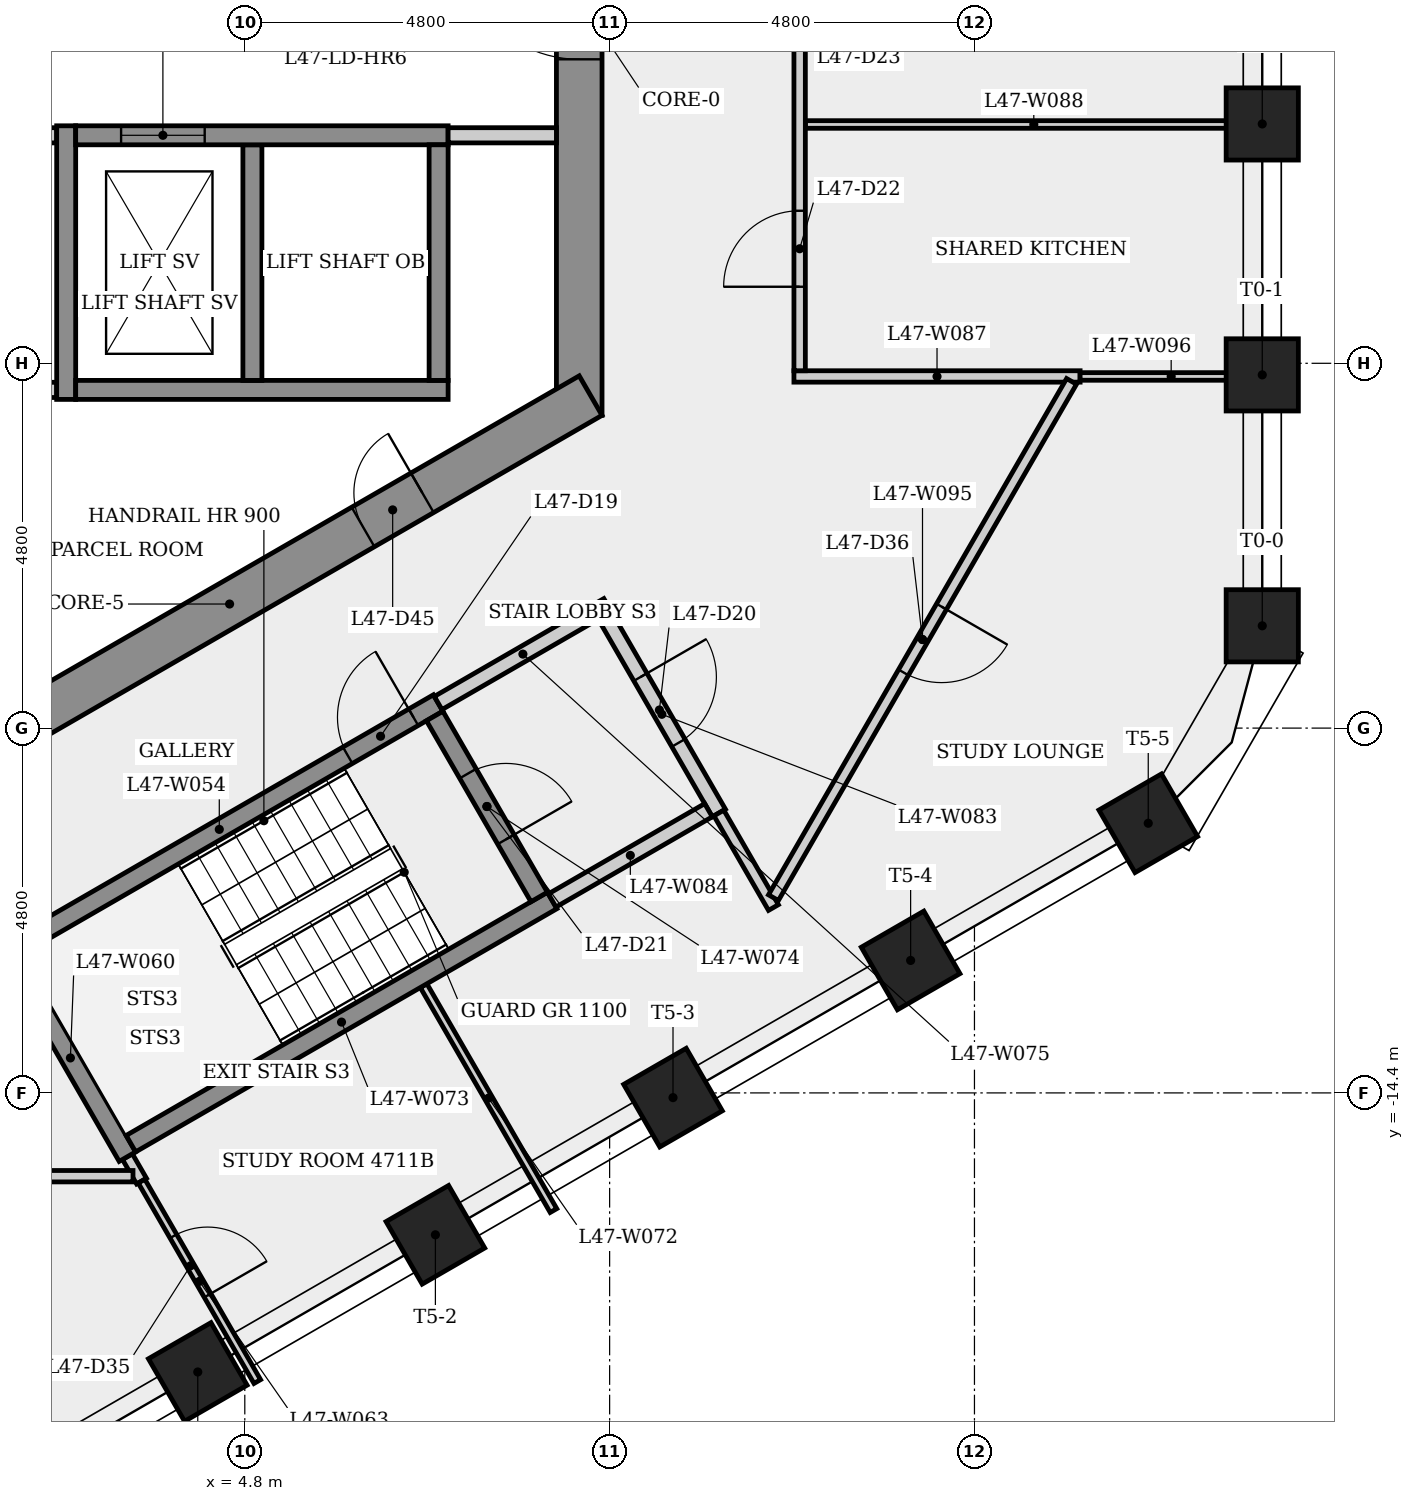
"""IFC4 building model, lengths in metres.
Left out: names, types, materials, properties, quantities, classifications, styles, units other than length and angle.
Written with IfcOpenShell. Run it as: python <this file> out.ifc"""

import sys

from ifc_helpers import new_model, si_unit, direction, frame, frame_2d, origin, origin_2d, place, context, subcontext, project, spatial, rectangle, extrude, element, fill, save


model = new_model("IFC4")
c1 = context("Model", 3, precision=1e-05, world=origin(), true_north=direction((0.0, 1.0)))
c2 = subcontext(c1, "Body", "Model", "MODEL_VIEW")
j1 = project(units=[si_unit("LENGTHUNIT", "METRE"), si_unit("PLANEANGLEUNIT", "RADIAN")], contexts=[c1])
p1 = place(None, origin())
s1 = spatial("IfcSite", under=j1, at=p1, CompositionType="ELEMENT")
p2 = place(p1, origin())
s2 = spatial("IfcBuilding", under=s1, at=p2, CompositionType="ELEMENT")
p3 = place(p2, frame((0.0, 0.0, 176.5)))
s3 = spatial("IfcBuildingStorey", under=s2, at=p3, CompositionType="ELEMENT", Elevation=176.5)
p4 = place(p3, frame((9.2, -5.485, 0.0), z_axis=(0.0, 0.0, 1.0), x_axis=(0.0, 1.0, 0.0)))
e1 = element("IfcWall", 1, at=p4, inside=s3, PredefinedType="SHEAR", context=c2, shape_type="SweptSolid", body=[
    extrude(rectangle(XDim=10.97, YDim=0.6, at=frame_2d((5.485, 0.0))), origin(), (0.0, 0.0, 1.0), 3.4),
])
p5 = place(p4, frame((4.685, 0.0, 0.0)))
e2 = element("IfcOpeningElement", 2, at=p5, cuts=e1, PredefinedType="OPENING", context=c2, shape_type="SweptSolid", body=[
    extrude(rectangle(XDim=1.6, YDim=2.1, at=frame_2d((0.8, 1.05))), frame((0.0, 0.31, 0.0), z_axis=(0.0, -1.0, 0.0), x_axis=(1.0, 0.0, 0.0)), (0.0, 0.0, 1.0), 0.62),
])
p6 = place(p3, frame((-0.15, -10.71, 0.0), z_axis=(0.0, 0.0, 1.0), x_axis=(0.866023993627, 0.500002442456, 0.0)))
e3 = element("IfcWall", 3, at=p6, inside=s3, PredefinedType="SHEAR", context=c2, shape_type="SweptSolid", body=[
    extrude(rectangle(XDim=10.97, YDim=0.6, at=frame_2d((5.485, 0.0))), origin(), (0.0, 0.0, 1.0), 3.4),
])
p7 = place(p6, frame((0.9, 0.0, 0.0)))
e4 = element("IfcOpeningElement", 4, at=p7, cuts=e3, PredefinedType="OPENING", context=c2, shape_type="SweptSolid", body=[
    extrude(rectangle(XDim=0.9, YDim=2.1, at=frame_2d((0.45, 1.05))), frame((0.0, 0.31, 0.0), z_axis=(0.0, -1.0, 0.0), x_axis=(1.0, 0.0, 0.0)), (0.0, 0.0, 1.0), 0.62),
])
p8 = place(p6, frame((7.512, 0.0, 0.0)))
e5 = element("IfcOpeningElement", 5, at=p8, cuts=e3, PredefinedType="OPENING", context=c2, shape_type="SweptSolid", body=[
    extrude(rectangle(XDim=0.9, YDim=2.1, at=frame_2d((0.45, 1.05))), frame((0.0, 0.31, 0.0), z_axis=(0.0, -1.0, 0.0), x_axis=(1.0, 0.0, 0.0)), (0.0, 0.0, 1.0), 0.62),
])
for number, where, z_axis, x_axis in (
    (6, (18.187, -8.254, 0.0), (0.0, 0.0, 1.0), (1.0, 0.0, 0.0)),
    (7, (18.187, -4.952, 0.0), (0.0, 0.0, 1.0), (1.0, 0.0, 0.0)),
    (8, (18.187, -1.651, 0.0), (0.0, 0.0, 1.0), (1.0, 0.0, 0.0)),
    (9, (4.181, -18.072, 0.0), (0.0, 0.0, 1.0), (0.5, -0.866, 0.0)),
    (10, (7.308, -16.267, 0.0), (0.0, 0.0, 1.0), (0.5, -0.866, 0.0)),
    (11, (10.434, -14.462, 0.0), (0.0, 0.0, 1.0), (0.5, -0.866, 0.0)),
    (12, (13.56, -12.657, 0.0), (0.0, 0.0, 1.0), (0.5, -0.866, 0.0)),
    (13, (16.687, -10.852, 0.0), (0.0, 0.0, 1.0), (0.5, -0.866, 0.0)),
):
    element("IfcColumn", number, at=place(p3, frame(where, z_axis=z_axis, x_axis=x_axis)), inside=s3, PredefinedType="COLUMN", context=c2, shape_type="SweptSolid", body=[
        extrude(rectangle(XDim=0.95, YDim=0.95, at=origin_2d()), origin(), (0.0, 0.0, 1.0), 3.4),
    ])
p9 = place(p3, frame((-8.88, -5.15, 0.0), z_axis=(0.0, 0.0, 1.0), x_axis=(1.0, 0.0, 0.0)))
e14 = element("IfcWall", 14, at=p9, inside=s3, PredefinedType="PARTITIONING", context=c2, shape_type="SweptSolid", body=[
    extrude(rectangle(XDim=11.205, YDim=0.2, at=frame_2d((5.603, 0.0))), origin(), (0.0, 0.0, 1.0), 3.05),
])
p10 = place(p3, frame((-8.9, -1.8, 0.0), z_axis=(0.0, 0.0, 1.0), x_axis=(1.0, 0.0, 0.0)))
e15 = element("IfcWall", 15, at=p10, inside=s3, PredefinedType="PARTITIONING", context=c2, shape_type="SweptSolid", body=[
    extrude(rectangle(XDim=11.225, YDim=0.2, at=frame_2d((5.613, 0.0))), origin(), (0.0, 0.0, 1.0), 3.05),
])
p11 = place(p10, frame((2.16, 0.0, 0.0)))
e16 = element("IfcOpeningElement", 16, at=p11, cuts=e15, PredefinedType="OPENING", context=c2, shape_type="SweptSolid", body=[
    extrude(rectangle(XDim=0.9, YDim=2.1, at=frame_2d((0.45, 1.05))), frame((0.0, 0.11, 0.0), z_axis=(0.0, -1.0, 0.0), x_axis=(1.0, 0.0, 0.0)), (0.0, 0.0, 1.0), 0.22),
])
p12 = place(p10, frame((6.61, 0.0, 0.0)))
e17 = element("IfcOpeningElement", 17, at=p12, cuts=e15, PredefinedType="OPENING", context=c2, shape_type="SweptSolid", body=[
    extrude(rectangle(XDim=0.9, YDim=2.1, at=frame_2d((0.45, 1.05))), frame((0.0, 0.11, 0.0), z_axis=(0.0, -1.0, 0.0), x_axis=(1.0, 0.0, 0.0)), (0.0, 0.0, 1.0), 0.22),
])
p13 = place(p10, frame((9.613, 0.0, 0.0)))
e18 = element("IfcOpeningElement", 18, at=p13, cuts=e15, PredefinedType="OPENING", context=c2, shape_type="SweptSolid", body=[
    extrude(rectangle(XDim=0.9, YDim=2.1, at=frame_2d((0.45, 1.05))), frame((0.0, 0.11, 0.0), z_axis=(0.0, -1.0, 0.0), x_axis=(1.0, 0.0, 0.0)), (0.0, 0.0, 1.0), 0.22),
])
p14 = place(p3, frame((1.585, -12.595, 0.0), z_axis=(0.0, 0.0, 1.0), x_axis=(0.866036417653, 0.499980922934, 0.0)))
e19 = element("IfcWall", 19, at=p14, inside=s3, PredefinedType="SHEAR", context=c2, shape_type="SweptSolid", body=[
    extrude(rectangle(XDim=6.65, YDim=0.25, at=frame_2d((3.325, 0.0))), origin(), (0.0, 0.0, 1.0), 3.05),
])
p15 = place(p14, frame((5.275, 0.0, 0.0)))
e20 = element("IfcOpeningElement", 20, at=p15, cuts=e19, PredefinedType="OPENING", context=c2, shape_type="SweptSolid", body=[
    extrude(rectangle(XDim=1.0, YDim=2.1, at=frame_2d((0.5, 1.05))), frame((0.0, 0.135, 0.0), z_axis=(0.0, -1.0, 0.0), x_axis=(1.0, 0.0, 0.0)), (0.0, 0.0, 1.0), 0.27),
])
p16 = place(p3, frame((2.45, -5.275, 0.0), z_axis=(0.0, 0.0, 1.0), x_axis=(0.0, 1.0, 0.0)))
e21 = element("IfcWall", 21, at=p16, inside=s3, PredefinedType="SHEAR", context=c2, shape_type="SweptSolid", body=[
    extrude(rectangle(XDim=3.6, YDim=0.25, at=frame_2d((1.8, 0.0))), origin(), (0.0, 0.0, 1.0), 3.05),
])
p17 = place(p3, frame((3.256, -15.239, 0.0), z_axis=(0.0, 0.0, 1.0), x_axis=(0.499949632511, -0.866054481515, 0.0)))
e22 = element("IfcWall", 22, at=p17, inside=s3, PredefinedType="PARTITIONING", context=c2, shape_type="SweptSolid", body=[
    extrude(rectangle(XDim=0.372, YDim=0.15, at=frame_2d((0.186, 0.0))), origin(), (0.0, 0.0, 1.0), 3.05),
])
p18 = place(p3, frame((3.256, -15.239, 0.0), z_axis=(0.0, 0.0, 1.0), x_axis=(-0.50002537861, 0.866010750942, 0.0)))
e23 = element("IfcWall", 23, at=p18, inside=s3, PredefinedType="SHEAR", context=c2, shape_type="SweptSolid", body=[
    extrude(rectangle(XDim=3.0, YDim=0.25, at=frame_2d((1.5, 0.0))), origin(), (0.0, 0.0, 1.0), 3.05),
])
p19 = place(p3, frame((3.329, -15.496, 0.0), z_axis=(0.0, 0.0, 1.0), x_axis=(-1.0, 0.0, 0.0)))
e24 = element("IfcWall", 24, at=p19, inside=s3, PredefinedType="PARTITIONING", context=c2, shape_type="SweptSolid", body=[
    extrude(rectangle(XDim=3.837, YDim=0.15, at=frame_2d((1.918, 0.0))), origin(), (0.0, 0.0, 1.0), 3.05),
])
p20 = place(p19, frame((1.418, 0.0, 0.0)))
e25 = element("IfcOpeningElement", 25, at=p20, cuts=e24, PredefinedType="OPENING", context=c2, shape_type="SweptSolid", body=[
    extrude(rectangle(XDim=1.0, YDim=2.1, at=frame_2d((0.5, 1.05))), frame((0.0, 0.085, 0.0), z_axis=(0.0, -1.0, 0.0), x_axis=(1.0, 0.0, 0.0)), (0.0, 0.0, 1.0), 0.17),
])
p21 = place(p3, frame((3.442, -15.561, 0.0), z_axis=(0.0, 0.0, 1.0), x_axis=(0.500002389912, -0.866024023964, 0.0)))
e26 = element("IfcWall", 26, at=p21, inside=s3, PredefinedType="PARTITIONING", context=c2, shape_type="SweptSolid", body=[
    extrude(rectangle(XDim=3.045, YDim=0.1, at=frame_2d((1.522, 0.0))), origin(), (0.0, 0.0, 1.0), 3.05),
])
p22 = place(p21, frame((0.837, 0.0, 0.0)))
e27 = element("IfcOpeningElement", 27, at=p22, cuts=e26, PredefinedType="OPENING", context=c2, shape_type="SweptSolid", body=[
    extrude(rectangle(XDim=0.9, YDim=2.1, at=frame_2d((0.45, 1.05))), frame((0.0, 0.06, 0.0), z_axis=(0.0, -1.0, 0.0), x_axis=(1.0, 0.0, 0.0)), (0.0, 0.0, 1.0), 0.12),
])
p23 = place(p3, frame((2.575, -5.15, 0.0), z_axis=(0.0, 0.0, 1.0), x_axis=(1.0, 0.0, 0.0)))
e28 = element("IfcWall", 28, at=p23, inside=s3, PredefinedType="SHEAR", context=c2, shape_type="SweptSolid", body=[
    extrude(rectangle(XDim=4.9, YDim=0.25, at=frame_2d((2.45, 0.0))), origin(), (0.0, 0.0, 1.0), 3.05),
])
p24 = place(p3, frame((4.9, -1.925, 0.0), z_axis=(0.0, 0.0, 1.0), x_axis=(0.0, -1.0, 0.0)))
e29 = element("IfcWall", 29, at=p24, inside=s3, PredefinedType="SHEAR", context=c2, shape_type="SweptSolid", body=[
    extrude(rectangle(XDim=3.1, YDim=0.25, at=frame_2d((1.55, 0.0))), origin(), (0.0, 0.0, 1.0), 3.4),
])
p25 = place(p3, frame((2.575, -1.8, 0.0), z_axis=(0.0, 0.0, 1.0), x_axis=(1.0, 0.0, 0.0)))
e30 = element("IfcWall", 30, at=p25, inside=s3, PredefinedType="SHEAR", context=c2, shape_type="SweptSolid", body=[
    extrude(rectangle(XDim=4.9, YDim=0.25, at=frame_2d((2.45, 0.0))), origin(), (0.0, 0.0, 1.0), 3.05),
])
p26 = place(p25, frame((0.597, 0.0, 0.0)))
e31 = element("IfcOpeningElement", 31, at=p26, cuts=e30, PredefinedType="OPENING", context=c2, shape_type="SweptSolid", body=[
    extrude(rectangle(XDim=1.1, YDim=2.1, at=frame_2d((0.55, 1.05))), frame((0.0, 0.135, 0.0), z_axis=(0.0, -1.0, 0.0), x_axis=(1.0, 0.0, 0.0)), (0.0, 0.0, 1.0), 0.27),
])
p27 = place(p3, frame((7.153, -12.989, 0.0), z_axis=(0.0, 0.0, 1.0), x_axis=(0.4999966448, -0.866027340901, 0.0)))
e32 = element("IfcWall", 32, at=p27, inside=s3, PredefinedType="PARTITIONING", context=c2, shape_type="SweptSolid", body=[
    extrude(rectangle(XDim=3.417, YDim=0.1, at=frame_2d((1.708, 0.0))), origin(), (0.0, 0.0, 1.0), 3.05),
])
p28 = place(p3, frame((3.301, -15.068, 0.0), z_axis=(0.0, 0.0, 1.0), x_axis=(0.866035036182, 0.499983315828, 0.0)))
e33 = element("IfcWall", 33, at=p28, inside=s3, PredefinedType="SHEAR", context=c2, shape_type="SweptSolid", body=[
    extrude(rectangle(XDim=6.4, YDim=0.25, at=frame_2d((3.2, 0.0))), origin(), (0.0, 0.0, 1.0), 3.05),
])
p29 = place(p3, frame((7.298, -9.441, 0.0), z_axis=(0.0, 0.0, 1.0), x_axis=(0.500034990121, -0.866005201286, 0.0)))
e34 = element("IfcWall", 34, at=p29, inside=s3, PredefinedType="SHEAR", context=c2, shape_type="SweptSolid", body=[
    extrude(rectangle(XDim=2.75, YDim=0.25, at=frame_2d((1.375, 0.0))), origin(), (0.0, 0.0, 1.0), 3.05),
])
p30 = place(p29, frame((0.875, 0.0, 0.0)))
e35 = element("IfcOpeningElement", 35, at=p30, cuts=e34, PredefinedType="OPENING", context=c2, shape_type="SweptSolid", body=[
    extrude(rectangle(XDim=1.0, YDim=2.1, at=frame_2d((0.5, 1.05))), frame((0.0, 0.135, 0.0), z_axis=(0.0, -1.0, 0.0), x_axis=(1.0, 0.0, 0.0)), (0.0, 0.0, 1.0), 0.27),
])
p31 = place(p3, frame((7.344, -9.27, 0.0), z_axis=(0.0, 0.0, 1.0), x_axis=(0.866005588531, 0.500034319456, 0.0)))
e36 = element("IfcWall", 36, at=p31, inside=s3, PredefinedType="PARTITIONING", context=c2, shape_type="SweptSolid", body=[
    extrude(rectangle(XDim=2.575, YDim=0.2, at=frame_2d((1.288, 0.0))), origin(), (0.0, 0.0, 1.0), 3.05),
])
p32 = place(p3, frame((7.35, -1.925, 0.0), z_axis=(0.0, 0.0, 1.0), x_axis=(0.0, -1.0, 0.0)))
e37 = element("IfcWall", 37, at=p32, inside=s3, PredefinedType="SHEAR", context=c2, shape_type="SweptSolid", body=[
    extrude(rectangle(XDim=3.1, YDim=0.25, at=frame_2d((1.55, 0.0))), origin(), (0.0, 0.0, 1.0), 3.4),
])
p33 = place(p3, frame((8.9, -1.8, 0.0), z_axis=(0.0, 0.0, 1.0), x_axis=(-1.0, 0.0, 0.0)))
e38 = element("IfcWall", 38, at=p33, inside=s3, PredefinedType="PARTITIONING", context=c2, shape_type="SweptSolid", body=[
    extrude(rectangle(XDim=1.425, YDim=0.2, at=frame_2d((0.712, 0.0))), origin(), (0.0, 0.0, 1.0), 3.05),
])
p34 = place(p3, frame((9.537, -8.119, 0.0), z_axis=(0.0, 0.0, 1.0), x_axis=(0.499990139034, -0.866031096941, 0.0)))
e39 = element("IfcWall", 39, at=p34, inside=s3, PredefinedType="PARTITIONING", context=c2, shape_type="SweptSolid", body=[
    extrude(rectangle(XDim=3.0, YDim=0.2, at=frame_2d((1.5, 0.0))), origin(), (0.0, 0.0, 1.0), 3.05),
])
p35 = place(p34, frame((0.935, 0.0, 0.0)))
e40 = element("IfcOpeningElement", 40, at=p35, cuts=e39, PredefinedType="OPENING", context=c2, shape_type="SweptSolid", body=[
    extrude(rectangle(XDim=1.0, YDim=2.1, at=frame_2d((0.5, 1.05))), frame((0.0, 0.11, 0.0), z_axis=(0.0, -1.0, 0.0), x_axis=(1.0, 0.0, 0.0)), (0.0, 0.0, 1.0), 0.22),
])
p36 = place(p3, frame((10.901, -10.681, 0.0), z_axis=(0.0, 0.0, 1.0), x_axis=(-0.866007538022, -0.500030943131, 0.0)))
e41 = element("IfcWall", 41, at=p36, inside=s3, PredefinedType="PARTITIONING", context=c2, shape_type="SweptSolid", body=[
    extrude(rectangle(XDim=2.375, YDim=0.2, at=frame_2d((1.188, 0.0))), origin(), (0.0, 0.0, 1.0), 3.05),
])
p37 = place(p3, frame((11.755, -11.961, 0.0), z_axis=(0.0, 0.0, 1.0), x_axis=(-0.49992355341, 0.866069535745, 0.0)))
e42 = element("IfcWall", 42, at=p37, inside=s3, PredefinedType="PARTITIONING", context=c2, shape_type="SweptSolid", body=[
    extrude(rectangle(XDim=1.436, YDim=0.15, at=frame_2d((0.718, 0.0))), origin(), (0.0, 0.0, 1.0), 3.05),
])
p38 = place(p3, frame((12.025, -4.973, 0.0), z_axis=(0.0, 0.0, 1.0), x_axis=(1.0, 0.0, 0.0)))
e43 = element("IfcWall", 43, at=p38, inside=s3, PredefinedType="PARTITIONING", context=c2, shape_type="SweptSolid", body=[
    extrude(rectangle(XDim=3.765, YDim=0.15, at=frame_2d((1.883, 0.0))), origin(), (0.0, 0.0, 1.0), 3.05),
])
p39 = place(p3, frame((12.175, -1.658, 0.0), z_axis=(0.0, 0.0, 1.0), x_axis=(1.0, 0.0, 0.0)))
e44 = element("IfcWall", 44, at=p39, inside=s3, PredefinedType="PARTITIONING", context=c2, shape_type="SweptSolid", body=[
    extrude(rectangle(XDim=6.011, YDim=0.1, at=frame_2d((3.006, 0.0))), origin(), (0.0, 0.0, 1.0), 3.05),
])
p40 = place(p3, frame((12.1, -4.898, 0.0), z_axis=(0.0, 0.0, 1.0), x_axis=(0.0, 1.0, 0.0)))
e45 = element("IfcWall", 45, at=p40, inside=s3, PredefinedType="PARTITIONING", context=c2, shape_type="SweptSolid", body=[
    extrude(rectangle(XDim=9.946, YDim=0.15, at=frame_2d((4.973, 0.0))), origin(), (0.0, 0.0, 1.0), 3.05),
])
p41 = place(p40, frame((1.105, 0.0, 0.0)))
e46 = element("IfcOpeningElement", 46, at=p41, cuts=e45, PredefinedType="OPENING", context=c2, shape_type="SweptSolid", body=[
    extrude(rectangle(XDim=1.0, YDim=2.1, at=frame_2d((0.5, 1.05))), frame((0.0, 0.085, 0.0), z_axis=(0.0, -1.0, 0.0), x_axis=(1.0, 0.0, 0.0)), (0.0, 0.0, 1.0), 0.17),
])
p42 = place(p40, frame((4.398, 0.0, 0.0)))
e47 = element("IfcOpeningElement", 47, at=p42, cuts=e45, PredefinedType="OPENING", context=c2, shape_type="SweptSolid", body=[
    extrude(rectangle(XDim=1.0, YDim=2.1, at=frame_2d((0.5, 1.05))), frame((0.0, 0.085, 0.0), z_axis=(0.0, -1.0, 0.0), x_axis=(1.0, 0.0, 0.0)), (0.0, 0.0, 1.0), 0.17),
])
p43 = place(p40, frame((7.713, 0.0, 0.0)))
e48 = element("IfcOpeningElement", 48, at=p43, cuts=e45, PredefinedType="OPENING", context=c2, shape_type="SweptSolid", body=[
    extrude(rectangle(XDim=1.0, YDim=2.1, at=frame_2d((0.5, 1.05))), frame((0.0, 0.085, 0.0), z_axis=(0.0, -1.0, 0.0), x_axis=(1.0, 0.0, 0.0)), (0.0, 0.0, 1.0), 0.17),
])
p44 = place(p3, frame((15.677, -5.038, 0.0), z_axis=(0.0, 0.0, 1.0), x_axis=(-0.500005339912, -0.866022320763, 0.0)))
e49 = element("IfcWall", 49, at=p44, inside=s3, PredefinedType="PARTITIONING", context=c2, shape_type="SweptSolid", body=[
    extrude(rectangle(XDim=7.844, YDim=0.15, at=frame_2d((3.922, 0.0))), origin(), (0.0, 0.0, 1.0), 3.05),
])
p45 = place(p44, frame((3.422, 0.0, 0.0)))
e50 = element("IfcOpeningElement", 50, at=p45, cuts=e49, PredefinedType="OPENING", context=c2, shape_type="SweptSolid", body=[
    extrude(rectangle(XDim=1.0, YDim=2.1, at=frame_2d((0.5, 1.05))), frame((0.0, 0.085, 0.0), z_axis=(0.0, -1.0, 0.0), x_axis=(1.0, 0.0, 0.0)), (0.0, 0.0, 1.0), 0.17),
])
p46 = place(p3, frame((18.187, -4.973, 0.0), z_axis=(0.0, 0.0, 1.0), x_axis=(-1.0, 0.0, 0.0)))
e51 = element("IfcWall", 51, at=p46, inside=s3, PredefinedType="PARTITIONING", context=c2, shape_type="SweptSolid", body=[
    extrude(rectangle(XDim=2.397, YDim=0.1, at=frame_2d((1.198, 0.0))), origin(), (0.0, 0.0, 1.0), 3.05),
])
p47 = place(p26, origin())
e52 = element("IfcDoor", 52, at=p47, inside=s3, OperationType="SLIDING_TO_LEFT", PredefinedType="DOOR", context=c2, shape_type="SweptSolid", body=[
    extrude(rectangle(XDim=1.1, YDim=2.1, at=frame_2d((0.55, 1.05))), frame((0.0, 0.025, 0.0), z_axis=(0.0, -1.0, 0.0), x_axis=(1.0, 0.0, 0.0)), (0.0, 0.0, 1.0), 0.05),
])
fill(e31, e52)
p48 = place(p15, origin())
e53 = element("IfcDoor", 53, at=p48, inside=s3, OperationType="SINGLE_SWING_RIGHT", PredefinedType="DOOR", context=c2, shape_type="SweptSolid", body=[
    extrude(rectangle(XDim=1.0, YDim=2.1, at=frame_2d((0.5, 1.05))), frame((0.0, 0.025, 0.0), z_axis=(0.0, -1.0, 0.0), x_axis=(1.0, 0.0, 0.0)), (0.0, 0.0, 1.0), 0.05),
])
fill(e20, e53)
p49 = place(p35, origin())
e54 = element("IfcDoor", 54, at=p49, inside=s3, OperationType="SINGLE_SWING_LEFT", PredefinedType="DOOR", context=c2, shape_type="SweptSolid", body=[
    extrude(rectangle(XDim=1.0, YDim=2.1, at=frame_2d((0.5, 1.05))), frame((0.0, 0.025, 0.0), z_axis=(0.0, -1.0, 0.0), x_axis=(1.0, 0.0, 0.0)), (0.0, 0.0, 1.0), 0.05),
])
fill(e40, e54)
p50 = place(p30, origin())
e55 = element("IfcDoor", 55, at=p50, inside=s3, OperationType="SINGLE_SWING_RIGHT", PredefinedType="DOOR", context=c2, shape_type="SweptSolid", body=[
    extrude(rectangle(XDim=1.0, YDim=2.1, at=frame_2d((0.5, 1.05))), frame((0.0, 0.025, 0.0), z_axis=(0.0, -1.0, 0.0), x_axis=(1.0, 0.0, 0.0)), (0.0, 0.0, 1.0), 0.05),
])
fill(e35, e55)
p51 = place(p41, origin())
e56 = element("IfcDoor", 56, at=p51, inside=s3, OperationType="SINGLE_SWING_LEFT", PredefinedType="DOOR", context=c2, shape_type="SweptSolid", body=[
    extrude(rectangle(XDim=1.0, YDim=2.1, at=frame_2d((0.5, 1.05))), frame((0.0, 0.025, 0.0), z_axis=(0.0, -1.0, 0.0), x_axis=(1.0, 0.0, 0.0)), (0.0, 0.0, 1.0), 0.05),
])
fill(e46, e56)
p52 = place(p22, origin())
e57 = element("IfcDoor", 57, at=p52, inside=s3, OperationType="SINGLE_SWING_RIGHT", PredefinedType="DOOR", context=c2, shape_type="SweptSolid", body=[
    extrude(rectangle(XDim=0.9, YDim=2.1, at=frame_2d((0.45, 1.05))), frame((0.0, 0.025, 0.0), z_axis=(0.0, -1.0, 0.0), x_axis=(1.0, 0.0, 0.0)), (0.0, 0.0, 1.0), 0.05),
])
fill(e27, e57)
p53 = place(p45, origin())
e58 = element("IfcDoor", 58, at=p53, inside=s3, OperationType="SINGLE_SWING_LEFT", PredefinedType="DOOR", context=c2, shape_type="SweptSolid", body=[
    extrude(rectangle(XDim=1.0, YDim=2.1, at=frame_2d((0.5, 1.05))), frame((0.0, 0.025, 0.0), z_axis=(0.0, -1.0, 0.0), x_axis=(1.0, 0.0, 0.0)), (0.0, 0.0, 1.0), 0.05),
])
fill(e50, e58)
p54 = place(p8, origin())
e59 = element("IfcDoor", 59, at=p54, inside=s3, OperationType="SINGLE_SWING_RIGHT", PredefinedType="DOOR", context=c2, shape_type="SweptSolid", body=[
    extrude(rectangle(XDim=0.9, YDim=2.1, at=frame_2d((0.45, 1.05))), frame((0.0, 0.025, 0.0), z_axis=(0.0, -1.0, 0.0), x_axis=(1.0, 0.0, 0.0)), (0.0, 0.0, 1.0), 0.05),
])
fill(e5, e59)
p55 = place(p5, origin())
e60 = element("IfcDoor", 60, at=p55, inside=s3, OperationType="SINGLE_SWING_RIGHT", PredefinedType="DOOR", context=c2, shape_type="SweptSolid", body=[
    extrude(rectangle(XDim=1.6, YDim=2.1, at=frame_2d((0.8, 1.05))), frame((0.0, 0.025, 0.0), z_axis=(0.0, -1.0, 0.0), x_axis=(1.0, 0.0, 0.0)), (0.0, 0.0, 1.0), 0.05),
])
fill(e2, e60)
save(model, sys.argv[1])
